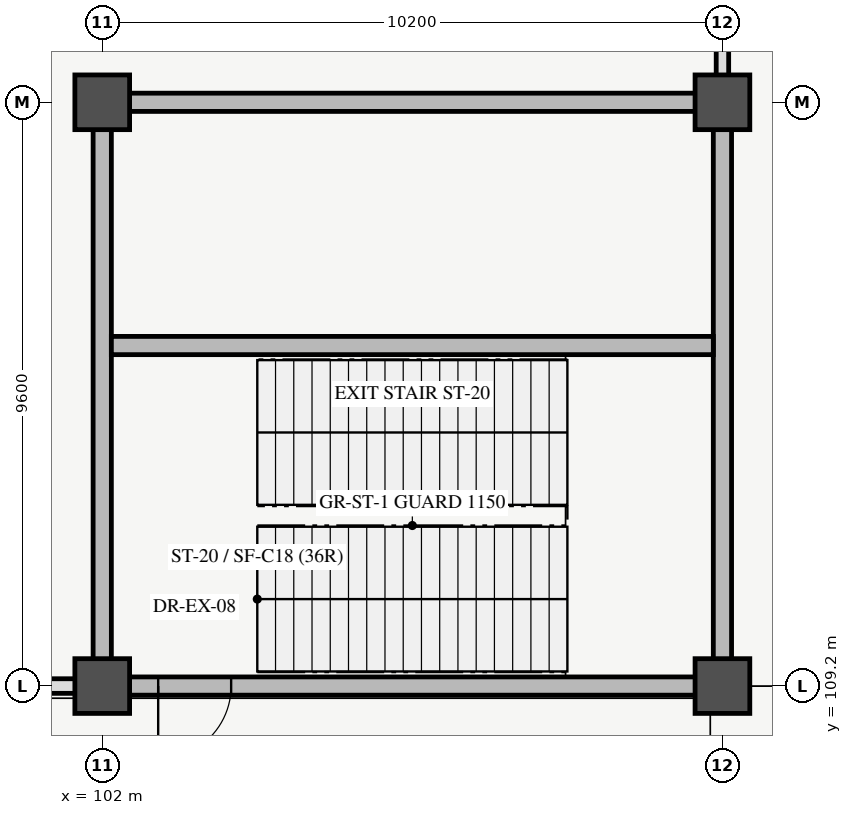
"""IFC4 building model, lengths in metres.
Left out: names, types, materials, properties, quantities, classifications, styles, units other than length and angle.
Written with IfcOpenShell. Run it as: python <this file> out.ifc"""

import sys

from ifc_helpers import new_model, si_unit, direction, frame, frame_2d, origin, origin_2d, place, context, subcontext, project, spatial, rectangle, extrude, element, fill, save


model = new_model("IFC4")
c1 = context("Model", 3, precision=1e-05, world=origin(), true_north=direction((0.0, 1.0)))
c2 = subcontext(c1, "Body", "Model", "MODEL_VIEW")
j1 = project(units=[si_unit("LENGTHUNIT", "METRE"), si_unit("PLANEANGLEUNIT", "RADIAN")], contexts=[c1])
p1 = place(None, origin())
s1 = spatial("IfcSite", under=j1, at=p1, CompositionType="ELEMENT")
p2 = place(p1, origin())
s2 = spatial("IfcBuilding", under=s1, at=p2, CompositionType="ELEMENT")
p3 = place(p2, origin())
s3 = spatial("IfcBuildingStorey", under=s2, at=p3, CompositionType="ELEMENT", Elevation=0.0)
for number, where, z_axis, x_axis in (
    (1, (102.0, 109.2, 0.0), (0.0, 0.0, 1.0), (1.0, 0.0, 0.0)),
    (2, (102.0, 118.8, 0.0), (0.0, 0.0, 1.0), (1.0, 0.0, 0.0)),
    (3, (112.2, 109.2, 0.0), (0.0, 0.0, 1.0), (1.0, 0.0, 0.0)),
    (4, (112.2, 118.8, 0.0), (0.0, 0.0, 1.0), (1.0, 0.0, 0.0)),
):
    element("IfcColumn", number, at=place(p3, frame(where, z_axis=z_axis, x_axis=x_axis)), inside=s3, PredefinedType="COLUMN", context=c2, shape_type="SweptSolid", body=[
        extrude(rectangle(XDim=0.9, YDim=0.9, at=origin_2d()), origin(), (0.0, 0.0, 1.0), 5.4),
    ])
p4 = place(p3, frame((92.04, 109.2, 0.0), z_axis=(0.0, 0.0, 1.0), x_axis=(1.0, 0.0, 0.0)))
e5 = element("IfcWall", 5, at=p4, inside=s3, PredefinedType="STANDARD", context=c2, shape_type="SweptSolid", body=[
    extrude(rectangle(XDim=9.72, YDim=0.24, at=frame_2d((4.86, 0.0))), origin(), (0.0, 0.0, 1.0), 3.68),
])
p5 = place(p4, frame((1.616, 0.0, 0.0)))
e6 = element("IfcOpeningElement", 6, at=p5, cuts=e5, PredefinedType="OPENING", context=c2, shape_type="SweptSolid", body=[
    extrude(rectangle(XDim=2.6, YDim=2.4, at=frame_2d((1.3, 1.2))), frame((0.0, 0.13, 0.0), z_axis=(0.0, -1.0, 0.0), x_axis=(1.0, 0.0, 0.0)), (0.0, 0.0, 1.0), 0.26),
])
p6 = place(p4, frame((4.81, 0.0, 0.9)))
e7 = element("IfcOpeningElement", 7, at=p6, cuts=e5, PredefinedType="OPENING", context=c2, shape_type="SweptSolid", body=[
    extrude(rectangle(XDim=3.6, YDim=2.1, at=frame_2d((1.8, 1.05))), frame((0.0, 0.13, 0.0), z_axis=(0.0, -1.0, 0.0), x_axis=(1.0, 0.0, 0.0)), (0.0, 0.0, 1.0), 0.26),
])
p7 = place(p3, frame((112.2, 119.04, 0.0), z_axis=(0.0, 0.0, 1.0), x_axis=(0.0, 1.0, 0.0)))
e8 = element("IfcWall", 8, at=p7, inside=s3, PredefinedType="STANDARD", context=c2, shape_type="SweptSolid", body=[
    extrude(rectangle(XDim=7.92, YDim=0.205, at=frame_2d((3.96, 0.0))), origin(), (0.0, 0.0, 1.0), 3.68),
])
p8 = place(p7, frame((2.76, 0.0, 0.0)))
e9 = element("IfcOpeningElement", 9, at=p8, cuts=e8, PredefinedType="OPENING", context=c2, shape_type="SweptSolid", body=[
    extrude(rectangle(XDim=2.4, YDim=2.4, at=frame_2d((1.2, 1.2))), frame((0.0, 0.113, 0.0), z_axis=(0.0, -1.0, 0.0), x_axis=(1.0, 0.0, 0.0)), (0.0, 0.0, 1.0), 0.225),
])
p9 = place(p3, frame((102.0, 109.2, 0.0), z_axis=(0.0, 0.0, 1.0), x_axis=(1.0, 0.0, 0.0)))
e10 = element("IfcWall", 10, at=p9, inside=s3, PredefinedType="SHEAR", context=c2, shape_type="SweptSolid", body=[
    extrude(rectangle(XDim=10.2, YDim=0.3, at=frame_2d((5.1, 0.0))), origin(), (0.0, 0.0, 1.0), 5.4),
])
p10 = place(p9, frame((0.92, 0.0, 0.0)))
e11 = element("IfcOpeningElement", 11, at=p10, cuts=e10, PredefinedType="OPENING", context=c2, shape_type="SweptSolid", body=[
    extrude(rectangle(XDim=1.2, YDim=2.2, at=frame_2d((0.6, 1.1))), frame((0.0, 0.16, 0.0), z_axis=(0.0, -1.0, 0.0), x_axis=(1.0, 0.0, 0.0)), (0.0, 0.0, 1.0), 0.32),
])
p11 = place(p3, frame((102.0, 118.8, 0.0), z_axis=(0.0, 0.0, 1.0), x_axis=(1.0, 0.0, 0.0)))
e12 = element("IfcWall", 12, at=p11, inside=s3, PredefinedType="SHEAR", context=c2, shape_type="SweptSolid", body=[
    extrude(rectangle(XDim=10.2, YDim=0.3, at=frame_2d((5.1, 0.0))), origin(), (0.0, 0.0, 1.0), 5.4),
])
for number, where, z_axis, x_axis in (
    (13, (102.0, 109.2, 0.0), (0.0, 0.0, 1.0), (0.0, 1.0, 0.0)),
    (14, (112.2, 109.2, 0.0), (0.0, 0.0, 1.0), (0.0, 1.0, 0.0)),
):
    element("IfcWall", number, at=place(p3, frame(where, z_axis=z_axis, x_axis=x_axis)), inside=s3, PredefinedType="SHEAR", context=c2, shape_type="SweptSolid", body=[
        extrude(rectangle(XDim=9.6, YDim=0.3, at=frame_2d((4.8, 0.0))), origin(), (0.0, 0.0, 1.0), 5.4),
    ])
p12 = place(p3, frame((102.15, 114.8, 0.0), z_axis=(0.0, 0.0, 1.0), x_axis=(1.0, 0.0, 0.0)))
e15 = element("IfcWall", 15, at=p12, inside=s3, PredefinedType="SHEAR", context=c2, shape_type="SweptSolid", body=[
    extrude(rectangle(XDim=9.9, YDim=0.3, at=frame_2d((4.95, 0.0))), origin(), (0.0, 0.0, 1.0), 5.4),
])
p13 = place(p10, frame((1.2, 0.0, 0.0), z_axis=(0.0, 0.0, 1.0), x_axis=(-1.0, 0.0, 0.0)))
e16 = element("IfcDoor", 16, at=p13, inside=s3, OperationType="SINGLE_SWING_LEFT", PredefinedType="DOOR", context=c2, shape_type="SweptSolid", body=[
    extrude(rectangle(XDim=1.2, YDim=2.2, at=frame_2d((0.6, 1.1))), frame((0.0, 0.025, 0.0), z_axis=(0.0, -1.0, 0.0), x_axis=(1.0, 0.0, 0.0)), (0.0, 0.0, 1.0), 0.05),
])
fill(e11, e16)
save(model, sys.argv[1])
